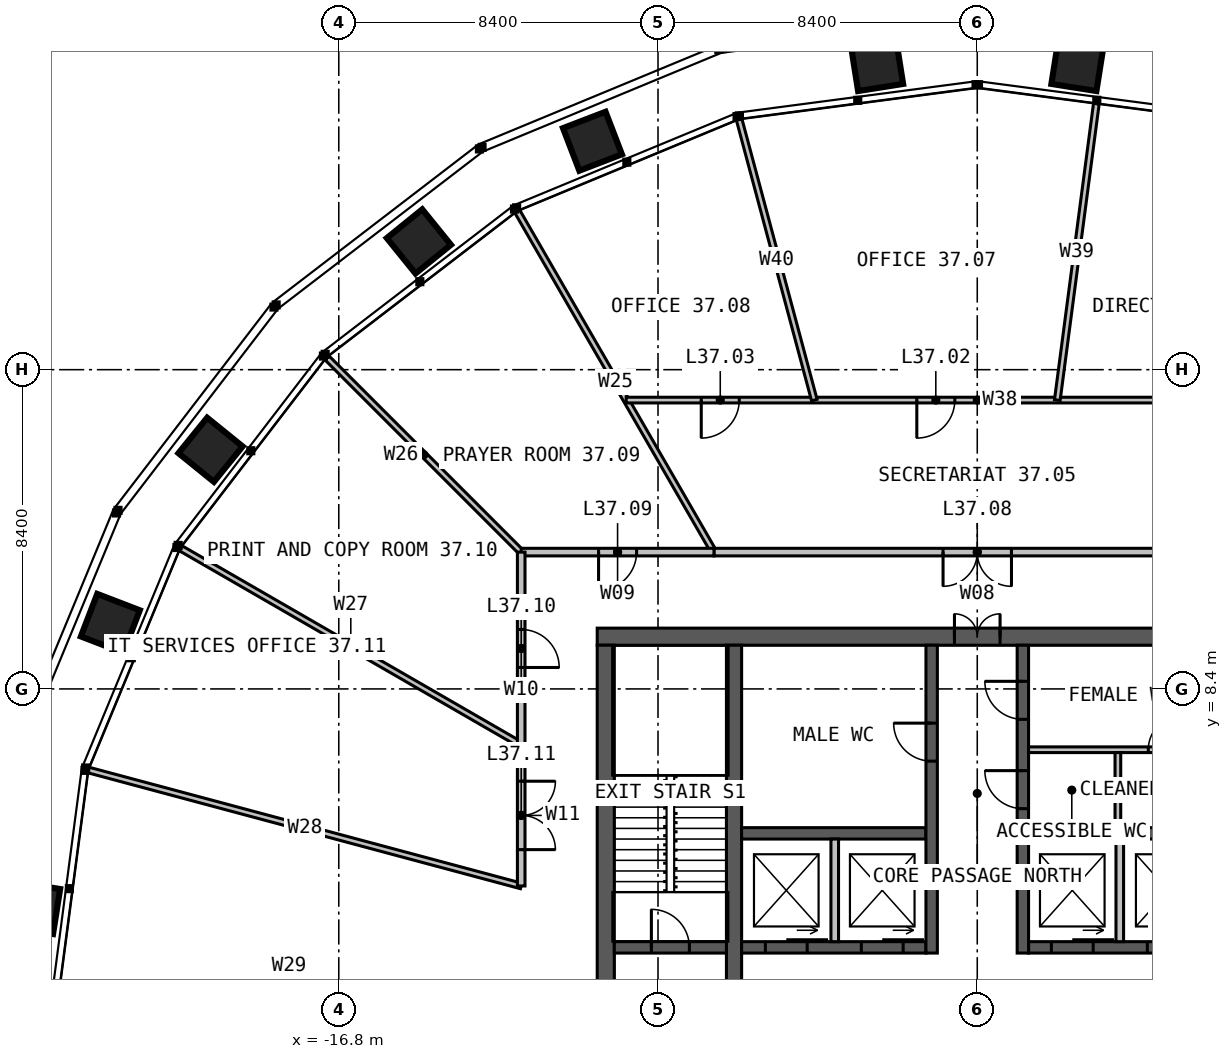
"""IFC4 building model, lengths in metres.
Left out: names, types, materials, properties, quantities, classifications, styles, units other than length and angle.
Written with IfcOpenShell. Run it as: python <this file> out.ifc"""

import sys

from ifc_helpers import new_model, si_unit, direction, frame, frame_2d, origin, place, context, subcontext, project, spatial, rectangle, extrude, element, fill, save


model = new_model("IFC4")
c1 = context("Model", 3, precision=1e-05, world=origin(), true_north=direction((0.0, 1.0)))
c2 = subcontext(c1, "Body", "Model", "MODEL_VIEW")
j1 = project(units=[si_unit("LENGTHUNIT", "METRE"), si_unit("PLANEANGLEUNIT", "RADIAN")], contexts=[c1])
p1 = place(None, origin())
s1 = spatial("IfcSite", under=j1, at=p1, CompositionType="ELEMENT")
p2 = place(p1, origin())
s2 = spatial("IfcBuilding", under=s1, at=p2, CompositionType="ELEMENT")
p3 = place(p2, frame((0.0, 0.0, 155.0)))
s3 = spatial("IfcBuildingStorey", under=s2, at=p3, CompositionType="ELEMENT", Elevation=155.0)
p4 = place(p3, frame((-10.0, 9.775, 0.0), z_axis=(0.0, 0.0, 1.0), x_axis=(1.0, 0.0, 0.0)))
e1 = element("IfcWall", 1, at=p4, inside=s3, PredefinedType="SOLIDWALL", context=c2, shape_type="SweptSolid", body=[
    extrude(rectangle(XDim=20.0, YDim=0.45, at=frame_2d((10.0, 0.0))), origin(), (0.0, 0.0, 1.0), 4.0),
])
p5 = place(p4, frame((9.4, 0.0, 0.0)))
e2 = element("IfcOpeningElement", 2, at=p5, cuts=e1, PredefinedType="OPENING", context=c2, shape_type="SweptSolid", body=[
    extrude(rectangle(XDim=1.2, YDim=2.2, at=frame_2d((0.6, 1.1))), frame((0.0, 0.235, 0.0), z_axis=(0.0, -1.0, 0.0), x_axis=(1.0, 0.0, 0.0)), (0.0, 0.0, 1.0), 0.47),
])
p6 = place(p3, frame((-9.775, 9.55, 0.0), z_axis=(0.0, 0.0, 1.0), x_axis=(0.0, -1.0, 0.0)))
e3 = element("IfcWall", 3, at=p6, inside=s3, PredefinedType="SOLIDWALL", context=c2, shape_type="SweptSolid", body=[
    extrude(rectangle(XDim=19.1, YDim=0.45, at=frame_2d((9.55, 0.0))), origin(), (0.0, 0.0, 1.0), 4.0),
])
p7 = place(p3, frame((-6.4, -9.55, 0.0), z_axis=(0.0, 0.0, 1.0), x_axis=(0.0, 1.0, 0.0)))
e4 = element("IfcWall", 4, at=p7, inside=s3, PredefinedType="SOLIDWALL", context=c2, shape_type="SweptSolid", body=[
    extrude(rectangle(XDim=19.1, YDim=0.4, at=frame_2d((9.55, 0.0))), origin(), (0.0, 0.0, 1.0), 4.0),
])
p8 = place(p7, frame((9.05, 0.0, 0.0)))
e5 = element("IfcOpeningElement", 5, at=p8, cuts=e4, PredefinedType="OPENING", context=c2, shape_type="SweptSolid", body=[
    extrude(rectangle(XDim=1.0, YDim=2.2, at=frame_2d((0.5, 1.1))), frame((0.0, 0.21, 0.0), z_axis=(0.0, -1.0, 0.0), x_axis=(1.0, 0.0, 0.0)), (0.0, 0.0, 1.0), 0.42),
])
p9 = place(p3, frame((-6.2, 1.6, 0.0), z_axis=(0.0, 0.0, 1.0), x_axis=(1.0, 0.0, 0.0)))
e6 = element("IfcWall", 6, at=p9, inside=s3, PredefinedType="SOLIDWALL", context=c2, shape_type="SweptSolid", body=[
    extrude(rectangle(XDim=4.85, YDim=0.3, at=frame_2d((2.425, 0.0))), origin(), (0.0, 0.0, 1.0), 4.0),
])
p10 = place(p9, frame((0.625, 0.0, 0.0)))
e7 = element("IfcOpeningElement", 7, at=p10, cuts=e6, PredefinedType="OPENING", context=c2, shape_type="SweptSolid", body=[
    extrude(rectangle(XDim=1.1, YDim=2.2, at=frame_2d((0.55, 1.1))), frame((0.0, 0.16, 0.0), z_axis=(0.0, -1.0, 0.0), x_axis=(1.0, 0.0, 0.0)), (0.0, 0.0, 1.0), 0.32),
])
p11 = place(p9, frame((3.15, 0.0, 0.0)))
e8 = element("IfcOpeningElement", 8, at=p11, cuts=e6, PredefinedType="OPENING", context=c2, shape_type="SweptSolid", body=[
    extrude(rectangle(XDim=1.1, YDim=2.2, at=frame_2d((0.55, 1.1))), frame((0.0, 0.16, 0.0), z_axis=(0.0, -1.0, 0.0), x_axis=(1.0, 0.0, 0.0)), (0.0, 0.0, 1.0), 0.32),
])
p12 = place(p3, frame((1.35, 1.6, 0.0), z_axis=(0.0, 0.0, 1.0), x_axis=(1.0, 0.0, 0.0)))
e9 = element("IfcWall", 9, at=p12, inside=s3, PredefinedType="SOLIDWALL", context=c2, shape_type="SweptSolid", body=[
    extrude(rectangle(XDim=4.85, YDim=0.3, at=frame_2d((2.425, 0.0))), origin(), (0.0, 0.0, 1.0), 4.0),
])
p13 = place(p12, frame((0.6, 0.0, 0.0)))
e10 = element("IfcOpeningElement", 10, at=p13, cuts=e9, PredefinedType="OPENING", context=c2, shape_type="SweptSolid", body=[
    extrude(rectangle(XDim=1.1, YDim=2.2, at=frame_2d((0.55, 1.1))), frame((0.0, 0.16, 0.0), z_axis=(0.0, -1.0, 0.0), x_axis=(1.0, 0.0, 0.0)), (0.0, 0.0, 1.0), 0.32),
])
p14 = place(p12, frame((3.125, 0.0, 0.0)))
e11 = element("IfcOpeningElement", 11, at=p14, cuts=e9, PredefinedType="OPENING", context=c2, shape_type="SweptSolid", body=[
    extrude(rectangle(XDim=1.1, YDim=2.2, at=frame_2d((0.55, 1.1))), frame((0.0, 0.16, 0.0), z_axis=(0.0, -1.0, 0.0), x_axis=(1.0, 0.0, 0.0)), (0.0, 0.0, 1.0), 0.32),
])
for number, where, z_axis, x_axis in (
    (12, (-6.2, 4.6, 0.0), (0.0, 0.0, 1.0), (1.0, 0.0, 0.0)),
    (13, (1.35, 4.6, 0.0), (0.0, 0.0, 1.0), (1.0, 0.0, 0.0)),
):
    element("IfcWall", number, at=place(p3, frame(where, z_axis=z_axis, x_axis=x_axis)), inside=s3, PredefinedType="SOLIDWALL", context=c2, shape_type="SweptSolid", body=[
        extrude(rectangle(XDim=4.85, YDim=0.3, at=frame_2d((2.425, 0.0))), origin(), (0.0, 0.0, 1.0), 4.0),
    ])
p15 = place(p3, frame((-1.2, 1.45, 0.0), z_axis=(0.0, 0.0, 1.0), x_axis=(0.0, 1.0, 0.0)))
e14 = element("IfcWall", 14, at=p15, inside=s3, PredefinedType="SOLIDWALL", context=c2, shape_type="SweptSolid", body=[
    extrude(rectangle(XDim=8.1, YDim=0.3, at=frame_2d((4.05, 0.0))), origin(), (0.0, 0.0, 1.0), 4.0),
])
p16 = place(p15, frame((5.05, 0.0, 0.0)))
e15 = element("IfcOpeningElement", 15, at=p16, cuts=e14, PredefinedType="OPENING", context=c2, shape_type="SweptSolid", body=[
    extrude(rectangle(XDim=1.0, YDim=2.2, at=frame_2d((0.5, 1.1))), frame((0.0, 0.16, 0.0), z_axis=(0.0, -1.0, 0.0), x_axis=(1.0, 0.0, 0.0)), (0.0, 0.0, 1.0), 0.32),
])
p17 = place(p3, frame((1.2, 1.45, 0.0), z_axis=(0.0, 0.0, 1.0), x_axis=(0.0, 1.0, 0.0)))
e16 = element("IfcWall", 16, at=p17, inside=s3, PredefinedType="SOLIDWALL", context=c2, shape_type="SweptSolid", body=[
    extrude(rectangle(XDim=8.1, YDim=0.3, at=frame_2d((4.05, 0.0))), origin(), (0.0, 0.0, 1.0), 4.0),
])
p18 = place(p17, frame((3.8, 0.0, 0.0)))
e17 = element("IfcOpeningElement", 17, at=p18, cuts=e16, PredefinedType="OPENING", context=c2, shape_type="SweptSolid", body=[
    extrude(rectangle(XDim=1.0, YDim=2.2, at=frame_2d((0.5, 1.1))), frame((0.0, 0.16, 0.0), z_axis=(0.0, -1.0, 0.0), x_axis=(1.0, 0.0, 0.0)), (0.0, 0.0, 1.0), 0.32),
])
p19 = place(p17, frame((6.15, 0.0, 0.0)))
e18 = element("IfcOpeningElement", 18, at=p19, cuts=e16, PredefinedType="OPENING", context=c2, shape_type="SweptSolid", body=[
    extrude(rectangle(XDim=1.0, YDim=2.2, at=frame_2d((0.5, 1.1))), frame((0.0, 0.16, 0.0), z_axis=(0.0, -1.0, 0.0), x_axis=(1.0, 0.0, 0.0)), (0.0, 0.0, 1.0), 0.32),
])
p20 = place(p3, frame((-9.55, 1.6, 0.0), z_axis=(0.0, 0.0, 1.0), x_axis=(1.0, 0.0, 0.0)))
e19 = element("IfcWall", 19, at=p20, inside=s3, PredefinedType="SOLIDWALL", context=c2, shape_type="SweptSolid", body=[
    extrude(rectangle(XDim=2.95, YDim=0.3, at=frame_2d((1.475, 0.0))), origin(), (0.0, 0.0, 1.0), 4.0),
])
p21 = place(p20, frame((0.975, 0.0, 0.0)))
e20 = element("IfcOpeningElement", 20, at=p21, cuts=e19, PredefinedType="OPENING", context=c2, shape_type="SweptSolid", body=[
    extrude(rectangle(XDim=1.0, YDim=2.2, at=frame_2d((0.5, 1.1))), frame((0.0, 0.16, 0.0), z_axis=(0.0, -1.0, 0.0), x_axis=(1.0, 0.0, 0.0)), (0.0, 0.0, 1.0), 0.32),
])
for number, where, z_axis, x_axis in (
    (21, (-3.75, 1.75, 0.0), (0.0, 0.0, 1.0), (0.0, 1.0, 0.0)),
    (22, (3.75, 1.75, 0.0), (0.0, 0.0, 1.0), (0.0, 1.0, 0.0)),
):
    element("IfcWall", number, at=place(p3, frame(where, z_axis=z_axis, x_axis=x_axis)), inside=s3, PredefinedType="SOLIDWALL", context=c2, shape_type="SweptSolid", body=[
        extrude(rectangle(XDim=2.7, YDim=0.2, at=frame_2d((1.35, 0.0))), origin(), (0.0, 0.0, 1.0), 3.75),
    ])
p22 = place(p3, frame((1.35, 6.8, 0.0), z_axis=(0.0, 0.0, 1.0), x_axis=(1.0, 0.0, 0.0)))
e23 = element("IfcWall", 23, at=p22, inside=s3, PredefinedType="PARTITIONING", context=c2, shape_type="SweptSolid", body=[
    extrude(rectangle(XDim=4.85, YDim=0.15, at=frame_2d((2.425, 0.0))), origin(), (0.0, 0.0, 1.0), 3.75),
])
p23 = place(p22, frame((3.15, 0.0, 0.0)))
e24 = element("IfcOpeningElement", 24, at=p23, cuts=e23, PredefinedType="OPENING", context=c2, shape_type="SweptSolid", body=[
    extrude(rectangle(XDim=0.9, YDim=2.2, at=frame_2d((0.45, 1.1))), frame((0.0, 0.085, 0.0), z_axis=(0.0, -1.0, 0.0), x_axis=(1.0, 0.0, 0.0)), (0.0, 0.0, 1.0), 0.17),
])
p24 = place(p3, frame((3.7, 4.75, 0.0), z_axis=(0.0, 0.0, 1.0), x_axis=(0.0, 1.0, 0.0)))
e25 = element("IfcWall", 25, at=p24, inside=s3, PredefinedType="PARTITIONING", context=c2, shape_type="SweptSolid", body=[
    extrude(rectangle(XDim=1.975, YDim=0.15, at=frame_2d((0.988, 0.0))), origin(), (0.0, 0.0, 1.0), 3.75),
])
p25 = place(p3, frame((-6.928, 12.0, 0.0), z_axis=(0.0, 0.0, 1.0), x_axis=(-0.500006140648, 0.86602185845, 0.0)))
e26 = element("IfcWall", 26, at=p25, inside=s3, PredefinedType="PARTITIONING", context=c2, shape_type="SweptSolid", body=[
    extrude(rectangle(XDim=10.355, YDim=0.15, at=frame_2d((5.177, 0.0))), origin(), (0.0, 0.0, 1.0), 2.89),
])
p26 = place(p3, frame((-12.0, 12.0, 0.0), z_axis=(0.0, 0.0, 1.0), x_axis=(-0.707106781187, 0.707106781187, 0.0)))
e27 = element("IfcWall", 27, at=p26, inside=s3, PredefinedType="PARTITIONING", context=c2, shape_type="SweptSolid", body=[
    extrude(rectangle(XDim=7.24, YDim=0.15, at=frame_2d((3.62, 0.0))), origin(), (0.0, 0.0, 1.0), 2.89),
])
p27 = place(p3, frame((-12.0, 6.928, 0.0), z_axis=(0.0, 0.0, 1.0), x_axis=(-0.86602185845, 0.500006140648, 0.0)))
e28 = element("IfcWall", 28, at=p27, inside=s3, PredefinedType="PARTITIONING", context=c2, shape_type="SweptSolid", body=[
    extrude(rectangle(XDim=10.355, YDim=0.15, at=frame_2d((5.177, 0.0))), origin(), (0.0, 0.0, 1.0), 2.89),
])
p28 = place(p3, frame((-12.0, 3.215, 0.0), z_axis=(0.0, 0.0, 1.0), x_axis=(-0.965923829901, 0.25882649561, 0.0)))
e29 = element("IfcWall", 29, at=p28, inside=s3, PredefinedType="PARTITIONING", context=c2, shape_type="SweptSolid", body=[
    extrude(rectangle(XDim=11.788, YDim=0.15, at=frame_2d((5.894, 0.0))), origin(), (0.0, 0.0, 1.0), 2.89),
])
p29 = place(p3, frame((9.238, 16.0, 0.0), z_axis=(0.0, 0.0, 1.0), x_axis=(-1.0, 0.0, 0.0)))
e30 = element("IfcWall", 30, at=p29, inside=s3, PredefinedType="PARTITIONING", context=c2, shape_type="SweptSolid", body=[
    extrude(rectangle(XDim=18.475, YDim=0.15, at=frame_2d((9.238, 0.0))), origin(), (0.0, 0.0, 1.0), 2.89),
])
p30 = place(p29, frame((3.066, 0.0, 0.0)))
e31 = element("IfcOpeningElement", 31, at=p30, cuts=e30, PredefinedType="OPENING", context=c2, shape_type="SweptSolid", body=[
    extrude(rectangle(XDim=1.0, YDim=2.2, at=frame_2d((0.5, 1.1))), frame((0.0, 0.085, 0.0), z_axis=(0.0, -1.0, 0.0), x_axis=(1.0, 0.0, 0.0)), (0.0, 0.0, 1.0), 0.17),
])
p31 = place(p29, frame((9.828, 0.0, 0.0)))
e32 = element("IfcOpeningElement", 32, at=p31, cuts=e30, PredefinedType="OPENING", context=c2, shape_type="SweptSolid", body=[
    extrude(rectangle(XDim=1.0, YDim=2.2, at=frame_2d((0.5, 1.1))), frame((0.0, 0.085, 0.0), z_axis=(0.0, -1.0, 0.0), x_axis=(1.0, 0.0, 0.0)), (0.0, 0.0, 1.0), 0.17),
])
p32 = place(p29, frame((15.5, 0.0, 0.0)))
e33 = element("IfcOpeningElement", 33, at=p32, cuts=e30, PredefinedType="OPENING", context=c2, shape_type="SweptSolid", body=[
    extrude(rectangle(XDim=1.0, YDim=2.2, at=frame_2d((0.5, 1.1))), frame((0.0, 0.085, 0.0), z_axis=(0.0, -1.0, 0.0), x_axis=(1.0, 0.0, 0.0)), (0.0, 0.0, 1.0), 0.17),
])
p33 = place(p3, frame((2.106, 16.0, 0.0), z_axis=(0.0, 0.0, 1.0), x_axis=(0.130510712839, 0.99144689915, 0.0)))
e34 = element("IfcWall", 34, at=p33, inside=s3, PredefinedType="PARTITIONING", context=c2, shape_type="SweptSolid", body=[
    extrude(rectangle(XDim=7.866, YDim=0.15, at=frame_2d((3.933, 0.0))), origin(), (0.0, 0.0, 1.0), 2.79),
])
p34 = place(p3, frame((-4.287, 16.0, 0.0), z_axis=(0.0, 0.0, 1.0), x_axis=(-0.25883290061, 0.965922113611, 0.0)))
e35 = element("IfcWall", 35, at=p34, inside=s3, PredefinedType="PARTITIONING", context=c2, shape_type="SweptSolid", body=[
    extrude(rectangle(XDim=7.647, YDim=0.15, at=frame_2d((3.823, 0.0))), origin(), (0.0, 0.0, 1.0), 2.89),
])
p35 = place(p3, frame((6.928, 12.0, 0.0), z_axis=(0.0, 0.0, 1.0), x_axis=(-1.0, 0.0, 0.0)))
e36 = element("IfcWall", 36, at=p35, inside=s3, PredefinedType="PARTITIONING", context=c2, shape_type="SweptSolid", body=[
    extrude(rectangle(XDim=13.856, YDim=0.2, at=frame_2d((6.928, 0.0))), origin(), (0.0, 0.0, 1.0), 3.8),
])
p36 = place(p35, frame((6.028, 0.0, 0.0)))
e37 = element("IfcOpeningElement", 37, at=p36, cuts=e36, PredefinedType="OPENING", context=c2, shape_type="SweptSolid", body=[
    extrude(rectangle(XDim=1.8, YDim=2.2, at=frame_2d((0.9, 1.1))), frame((0.0, 0.11, 0.0), z_axis=(0.0, -1.0, 0.0), x_axis=(1.0, 0.0, 0.0)), (0.0, 0.0, 1.0), 0.22),
])
p37 = place(p3, frame((-6.928, 12.0, 0.0), z_axis=(0.0, 0.0, 1.0), x_axis=(-1.0, 0.0, 0.0)))
e38 = element("IfcWall", 38, at=p37, inside=s3, PredefinedType="PARTITIONING", context=c2, shape_type="SweptSolid", body=[
    extrude(rectangle(XDim=5.072, YDim=0.2, at=frame_2d((2.536, 0.0))), origin(), (0.0, 0.0, 1.0), 3.8),
])
p38 = place(p37, frame((2.036, 0.0, 0.0)))
e39 = element("IfcOpeningElement", 39, at=p38, cuts=e38, PredefinedType="OPENING", context=c2, shape_type="SweptSolid", body=[
    extrude(rectangle(XDim=1.0, YDim=2.2, at=frame_2d((0.5, 1.1))), frame((0.0, 0.11, 0.0), z_axis=(0.0, -1.0, 0.0), x_axis=(1.0, 0.0, 0.0)), (0.0, 0.0, 1.0), 0.22),
])
p39 = place(p3, frame((-12.0, 12.0, 0.0), z_axis=(0.0, 0.0, 1.0), x_axis=(0.0, -1.0, 0.0)))
e40 = element("IfcWall", 40, at=p39, inside=s3, PredefinedType="PARTITIONING", context=c2, shape_type="SweptSolid", body=[
    extrude(rectangle(XDim=5.072, YDim=0.2, at=frame_2d((2.536, 0.0))), origin(), (0.0, 0.0, 1.0), 3.8),
])
p40 = place(p39, frame((2.036, 0.0, 0.0)))
e41 = element("IfcOpeningElement", 41, at=p40, cuts=e40, PredefinedType="OPENING", context=c2, shape_type="SweptSolid", body=[
    extrude(rectangle(XDim=1.0, YDim=2.2, at=frame_2d((0.5, 1.1))), frame((0.0, 0.11, 0.0), z_axis=(0.0, -1.0, 0.0), x_axis=(1.0, 0.0, 0.0)), (0.0, 0.0, 1.0), 0.22),
])
p41 = place(p3, frame((-12.0, 6.928, 0.0), z_axis=(0.0, 0.0, 1.0), x_axis=(0.0, -1.0, 0.0)))
e42 = element("IfcWall", 42, at=p41, inside=s3, PredefinedType="PARTITIONING", context=c2, shape_type="SweptSolid", body=[
    extrude(rectangle(XDim=3.713, YDim=0.2, at=frame_2d((1.856, 0.0))), origin(), (0.0, 0.0, 1.0), 3.8),
])
p42 = place(p41, frame((0.956, 0.0, 0.0)))
e43 = element("IfcOpeningElement", 43, at=p42, cuts=e42, PredefinedType="OPENING", context=c2, shape_type="SweptSolid", body=[
    extrude(rectangle(XDim=1.8, YDim=2.2, at=frame_2d((0.9, 1.1))), frame((0.0, 0.11, 0.0), z_axis=(0.0, -1.0, 0.0), x_axis=(1.0, 0.0, 0.0)), (0.0, 0.0, 1.0), 0.22),
])
p43 = place(p5, origin())
e44 = element("IfcDoor", 44, at=p43, inside=s3, OperationType="DOUBLE_DOOR_SINGLE_SWING", PredefinedType="DOOR", context=c2, shape_type="SweptSolid", body=[
    extrude(rectangle(XDim=1.2, YDim=2.2, at=frame_2d((0.6, 1.1))), frame((0.0, 0.025, 0.0), z_axis=(0.0, -1.0, 0.0), x_axis=(1.0, 0.0, 0.0)), (0.0, 0.0, 1.0), 0.05),
])
fill(e2, e44)
p44 = place(p21, origin())
e45 = element("IfcDoor", 45, at=p44, inside=s3, OperationType="SINGLE_SWING_LEFT", PredefinedType="DOOR", context=c2, shape_type="SweptSolid", body=[
    extrude(rectangle(XDim=1.0, YDim=2.2, at=frame_2d((0.5, 1.1))), frame((0.0, 0.025, 0.0), z_axis=(0.0, -1.0, 0.0), x_axis=(1.0, 0.0, 0.0)), (0.0, 0.0, 1.0), 0.05),
])
fill(e20, e45)
p45 = place(p16, origin())
e46 = element("IfcDoor", 46, at=p45, inside=s3, OperationType="SINGLE_SWING_RIGHT", PredefinedType="DOOR", context=c2, shape_type="SweptSolid", body=[
    extrude(rectangle(XDim=1.0, YDim=2.2, at=frame_2d((0.5, 1.1))), frame((0.0, 0.025, 0.0), z_axis=(0.0, -1.0, 0.0), x_axis=(1.0, 0.0, 0.0)), (0.0, 0.0, 1.0), 0.05),
])
fill(e15, e46)
p46 = place(p18, origin())
e47 = element("IfcDoor", 47, at=p46, inside=s3, OperationType="SINGLE_SWING_RIGHT", PredefinedType="DOOR", context=c2, shape_type="SweptSolid", body=[
    extrude(rectangle(XDim=1.0, YDim=2.2, at=frame_2d((0.5, 1.1))), frame((0.0, 0.025, 0.0), z_axis=(0.0, -1.0, 0.0), x_axis=(1.0, 0.0, 0.0)), (0.0, 0.0, 1.0), 0.05),
])
fill(e17, e47)
p47 = place(p19, origin())
e48 = element("IfcDoor", 48, at=p47, inside=s3, OperationType="SINGLE_SWING_RIGHT", PredefinedType="DOOR", context=c2, shape_type="SweptSolid", body=[
    extrude(rectangle(XDim=1.0, YDim=2.2, at=frame_2d((0.5, 1.1))), frame((0.0, 0.025, 0.0), z_axis=(0.0, -1.0, 0.0), x_axis=(1.0, 0.0, 0.0)), (0.0, 0.0, 1.0), 0.05),
])
fill(e18, e48)
p48 = place(p23, origin())
e49 = element("IfcDoor", 49, at=p48, inside=s3, OperationType="SINGLE_SWING_RIGHT", PredefinedType="DOOR", context=c2, shape_type="SweptSolid", body=[
    extrude(rectangle(XDim=0.9, YDim=2.2, at=frame_2d((0.45, 1.1))), frame((0.0, 0.025, 0.0), z_axis=(0.0, -1.0, 0.0), x_axis=(1.0, 0.0, 0.0)), (0.0, 0.0, 1.0), 0.05),
])
fill(e24, e49)
p49 = place(p10, origin())
e50 = element("IfcDoor", 50, at=p49, inside=s3, OperationType="SLIDING_TO_LEFT", PredefinedType="DOOR", context=c2, shape_type="SweptSolid", body=[
    extrude(rectangle(XDim=1.1, YDim=2.2, at=frame_2d((0.55, 1.1))), frame((0.0, 0.025, 0.0), z_axis=(0.0, -1.0, 0.0), x_axis=(1.0, 0.0, 0.0)), (0.0, 0.0, 1.0), 0.05),
])
fill(e7, e50)
p50 = place(p11, origin())
e51 = element("IfcDoor", 51, at=p50, inside=s3, OperationType="SLIDING_TO_LEFT", PredefinedType="DOOR", context=c2, shape_type="SweptSolid", body=[
    extrude(rectangle(XDim=1.1, YDim=2.2, at=frame_2d((0.55, 1.1))), frame((0.0, 0.025, 0.0), z_axis=(0.0, -1.0, 0.0), x_axis=(1.0, 0.0, 0.0)), (0.0, 0.0, 1.0), 0.05),
])
fill(e8, e51)
p51 = place(p13, origin())
e52 = element("IfcDoor", 52, at=p51, inside=s3, OperationType="SLIDING_TO_LEFT", PredefinedType="DOOR", context=c2, shape_type="SweptSolid", body=[
    extrude(rectangle(XDim=1.1, YDim=2.2, at=frame_2d((0.55, 1.1))), frame((0.0, 0.025, 0.0), z_axis=(0.0, -1.0, 0.0), x_axis=(1.0, 0.0, 0.0)), (0.0, 0.0, 1.0), 0.05),
])
fill(e10, e52)
p52 = place(p14, origin())
e53 = element("IfcDoor", 53, at=p52, inside=s3, OperationType="SLIDING_TO_LEFT", PredefinedType="DOOR", context=c2, shape_type="SweptSolid", body=[
    extrude(rectangle(XDim=1.1, YDim=2.2, at=frame_2d((0.55, 1.1))), frame((0.0, 0.025, 0.0), z_axis=(0.0, -1.0, 0.0), x_axis=(1.0, 0.0, 0.0)), (0.0, 0.0, 1.0), 0.05),
])
fill(e11, e53)
p53 = place(p31, origin())
e54 = element("IfcDoor", 54, at=p53, inside=s3, OperationType="SINGLE_SWING_RIGHT", PredefinedType="DOOR", context=c2, shape_type="SweptSolid", body=[
    extrude(rectangle(XDim=1.0, YDim=2.2, at=frame_2d((0.5, 1.1))), frame((0.0, 0.025, 0.0), z_axis=(0.0, -1.0, 0.0), x_axis=(1.0, 0.0, 0.0)), (0.0, 0.0, 1.0), 0.05),
])
fill(e32, e54)
p54 = place(p32, origin())
e55 = element("IfcDoor", 55, at=p54, inside=s3, OperationType="SINGLE_SWING_RIGHT", PredefinedType="DOOR", context=c2, shape_type="SweptSolid", body=[
    extrude(rectangle(XDim=1.0, YDim=2.2, at=frame_2d((0.5, 1.1))), frame((0.0, 0.025, 0.0), z_axis=(0.0, -1.0, 0.0), x_axis=(1.0, 0.0, 0.0)), (0.0, 0.0, 1.0), 0.05),
])
fill(e33, e55)
p55 = place(p36, origin())
e56 = element("IfcDoor", 56, at=p55, inside=s3, OperationType="DOUBLE_DOOR_SINGLE_SWING", PredefinedType="DOOR", context=c2, shape_type="SweptSolid", body=[
    extrude(rectangle(XDim=1.8, YDim=2.2, at=frame_2d((0.9, 1.1))), frame((0.0, 0.025, 0.0), z_axis=(0.0, -1.0, 0.0), x_axis=(1.0, 0.0, 0.0)), (0.0, 0.0, 1.0), 0.05),
])
fill(e37, e56)
p56 = place(p38, origin())
e57 = element("IfcDoor", 57, at=p56, inside=s3, OperationType="SINGLE_SWING_RIGHT", PredefinedType="DOOR", context=c2, shape_type="SweptSolid", body=[
    extrude(rectangle(XDim=1.0, YDim=2.2, at=frame_2d((0.5, 1.1))), frame((0.0, 0.025, 0.0), z_axis=(0.0, -1.0, 0.0), x_axis=(1.0, 0.0, 0.0)), (0.0, 0.0, 1.0), 0.05),
])
fill(e39, e57)
p57 = place(p40, origin())
e58 = element("IfcDoor", 58, at=p57, inside=s3, OperationType="SINGLE_SWING_RIGHT", PredefinedType="DOOR", context=c2, shape_type="SweptSolid", body=[
    extrude(rectangle(XDim=1.0, YDim=2.2, at=frame_2d((0.5, 1.1))), frame((0.0, 0.025, 0.0), z_axis=(0.0, -1.0, 0.0), x_axis=(1.0, 0.0, 0.0)), (0.0, 0.0, 1.0), 0.05),
])
fill(e41, e58)
p58 = place(p42, origin())
e59 = element("IfcDoor", 59, at=p58, inside=s3, OperationType="DOUBLE_DOOR_SINGLE_SWING", PredefinedType="DOOR", context=c2, shape_type="SweptSolid", body=[
    extrude(rectangle(XDim=1.8, YDim=2.2, at=frame_2d((0.9, 1.1))), frame((0.0, 0.025, 0.0), z_axis=(0.0, -1.0, 0.0), x_axis=(1.0, 0.0, 0.0)), (0.0, 0.0, 1.0), 0.05),
])
fill(e43, e59)
save(model, sys.argv[1])
